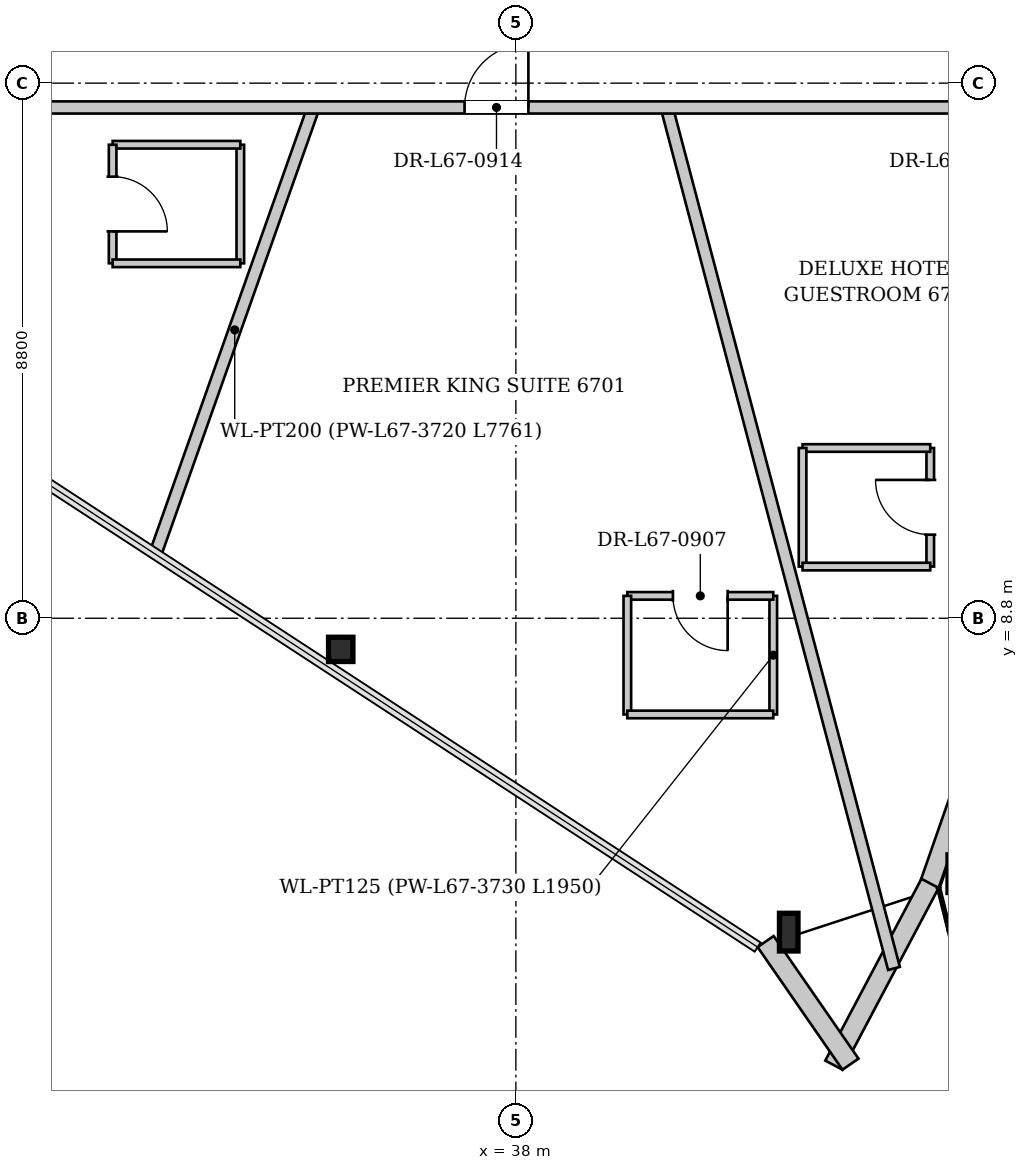
"""IFC4 building model, lengths in metres.
Left out: names, types, materials, properties, quantities, classifications, styles, units other than length and angle.
Written with IfcOpenShell. Run it as: python <this file> out.ifc"""

import sys

from ifc_helpers import new_model, si_unit, direction, frame, frame_2d, origin, origin_2d, place, context, subcontext, project, spatial, rectangle, i_section, extrude, source, transform, mapped, element, fill, save


model = new_model("IFC4")
c1 = context("Model", 3, precision=1e-05, world=origin(), true_north=direction((0.0, 1.0)))
c2 = subcontext(c1, "Body", "Model", "MODEL_VIEW")
j1 = project(units=[si_unit("LENGTHUNIT", "METRE"), si_unit("PLANEANGLEUNIT", "RADIAN")], contexts=[c1])
p1 = place(None, origin())
s1 = spatial("IfcSite", under=j1, at=p1, CompositionType="ELEMENT")
p2 = place(p1, origin())
s2 = spatial("IfcBuilding", under=s1, at=p2, CompositionType="ELEMENT")
p3 = place(p2, frame((0.0, 0.0, 252.5)))
s3 = spatial("IfcBuildingStorey", under=s2, at=p3, CompositionType="ELEMENT", Elevation=252.5)
m1 = source(origin(), c2, "Body", "SweptSolid", [
    extrude(i_section(OverallWidth=0.401, OverallDepth=0.399, WebThickness=0.022, FlangeThickness=0.034, at=origin_2d()), origin(), (0.0, 0.0, 1.0), 3.565),
])
p4 = place(p3, frame((34.659, 8.166, 0.0), z_axis=(0.25846285316, 0.068553607847, 0.963585676724), x_axis=(-0.256371217802, 0.966578397587, 0.0)))
e1 = element("IfcColumn", 1, at=p4, inside=s3, PredefinedType="COLUMN", context=c2, shape_type="MappedRepresentation", body=[
    mapped(m1, transform((0.0, 0.0, 0.0), x_axis=(1.0, 0.0, 0.0), y_axis=(0.0, 1.0, 0.0), z_axis=(0.0, 0.0, 1.0), scale=1.0)),
])
m2 = source(origin(), c2, "Body", "SweptSolid", [
    extrude(i_section(OverallWidth=0.305, OverallDepth=0.62, WebThickness=0.021, FlangeThickness=0.04, at=origin_2d()), origin(), (0.0, 0.0, 1.0), 3.618),
])
p5 = place(p3, frame((41.976, 3.392, 0.0), z_axis=(0.282567518432, 0.136121013776, 0.949540239872), x_axis=(-0.433996754877, 0.900914433649, 0.0)))
e2 = element("IfcColumn", 2, at=p5, inside=s3, PredefinedType="COLUMN", context=c2, shape_type="MappedRepresentation", body=[
    mapped(m2, transform((0.0, 0.0, 0.0), x_axis=(1.0, 0.0, 0.0), y_axis=(0.0, 1.0, 0.0), z_axis=(0.0, 0.0, 1.0), scale=1.0)),
])
m3 = source(origin(), c2, "Body", "SweptSolid", [
    extrude(i_section(OverallWidth=0.305, OverallDepth=0.62, WebThickness=0.021, FlangeThickness=0.04, at=origin_2d()), origin(), (0.0, 0.0, 1.0), 3.521),
])
p6 = place(p3, frame((44.953, 4.365, 0.0), z_axis=(0.174187178706, 0.133344723189, 0.975642358435), x_axis=(-0.607860680587, 0.794043697158, 0.0)))
e3 = element("IfcColumn", 3, at=p6, inside=s3, PredefinedType="COLUMN", context=c2, shape_type="MappedRepresentation", body=[
    mapped(m3, transform((0.0, 0.0, 0.0), x_axis=(1.0, 0.0, 0.0), y_axis=(0.0, 1.0, 0.0), z_axis=(0.0, 0.0, 1.0), scale=1.0)),
])
p7 = place(p3, frame((52.264, 25.817, 0.0), z_axis=(0.0, 0.0, 1.0), x_axis=(-0.329283040193, -0.944231263749, 0.0)))
e4 = element("IfcWall", 4, at=p7, inside=s3, PredefinedType="SOLIDWALL", context=c2, shape_type="SweptSolid", body=[
    extrude(rectangle(XDim=22.663, YDim=0.32, at=frame_2d((11.332, 0.0))), origin(), (0.0, 0.0, 1.0), 2.872),
])
p8 = place(p7, frame((6.502, 0.0, 0.0)))
e5 = element("IfcOpeningElement", 5, at=p8, cuts=e4, PredefinedType="OPENING", context=c2, shape_type="SweptSolid", body=[
    extrude(rectangle(XDim=1.5, YDim=2.3, at=frame_2d((0.75, 1.15))), frame((0.0, 0.17, 0.0), z_axis=(0.0, -1.0, 0.0), x_axis=(1.0, 0.0, 0.0)), (0.0, 0.0, 1.0), 0.34),
])
p9 = place(p7, frame((15.471, 0.0, 0.402)))
e6 = element("IfcOpeningElement", 6, at=p9, cuts=e4, PredefinedType="OPENING", context=c2, shape_type="SweptSolid", body=[
    extrude(rectangle(XDim=2.6, YDim=2.35, at=frame_2d((1.3, 1.175))), frame((0.0, 0.17, 0.0), z_axis=(0.0, -1.0, 0.0), x_axis=(1.0, 0.0, 0.0)), (0.0, 0.0, 1.0), 0.34),
])
p10 = place(p3, frame((44.812, 4.44, 0.0), z_axis=(0.0, 0.0, 1.0), x_axis=(-0.467628956956, -0.883924860277, 0.0)))
e7 = element("IfcWall", 7, at=p10, inside=s3, PredefinedType="SOLIDWALL", context=c2, shape_type="SweptSolid", body=[
    extrude(rectangle(XDim=3.382, YDim=0.32, at=frame_2d((1.691, 0.0))), origin(), (0.0, 0.0, 1.0), 2.872),
])
p11 = place(p3, frame((43.503, 1.467, 0.0), z_axis=(0.0, 0.0, 1.0), x_axis=(-0.569023575379, 0.822321208934, 0.0)))
e8 = element("IfcWall", 8, at=p11, inside=s3, PredefinedType="SOLIDWALL", context=c2, shape_type="SweptSolid", body=[
    extrude(rectangle(XDim=2.452, YDim=0.32, at=frame_2d((1.226, 0.0))), origin(), (0.0, 0.0, 1.0), 2.872),
])
p12 = place(p3, frame((34.671, 17.2, 0.0), z_axis=(0.0, 0.0, 1.0), x_axis=(-0.333820355847, -0.942636711582, 0.0)))
e9 = element("IfcWall", 9, at=p12, inside=s3, PredefinedType="PARTITIONING", context=c2, shape_type="SweptSolid", body=[
    extrude(rectangle(XDim=7.761, YDim=0.2, at=frame_2d((3.881, 0.0))), origin(), (0.0, 0.0, 1.0), 3.38),
])
p13 = place(p3, frame((40.481, 17.2, 0.0), z_axis=(0.0, 0.0, 1.0), x_axis=(0.255204698794, -0.96688704703, 0.0)))
e10 = element("IfcWall", 10, at=p13, inside=s3, PredefinedType="PARTITIONING", context=c2, shape_type="SweptSolid", body=[
    extrude(rectangle(XDim=14.644, YDim=0.2, at=frame_2d((7.322, 0.0))), origin(), (0.0, 0.0, 1.0), 3.38),
])
p14 = place(p3, frame((42.233, 7.218, 0.0), z_axis=(0.0, 0.0, 1.0), x_axis=(0.0, 1.0, 0.0)))
e11 = element("IfcWall", 11, at=p14, inside=s3, PredefinedType="PARTITIONING", context=c2, shape_type="SweptSolid", body=[
    extrude(rectangle(XDim=1.95, YDim=0.125, at=frame_2d((0.975, 0.0))), origin(), (0.0, 0.0, 1.0), 3.055),
])
p15 = place(p3, frame((42.233, 9.168, 0.0), z_axis=(0.0, 0.0, 1.0), x_axis=(-1.0, 0.0, 0.0)))
e12 = element("IfcWall", 12, at=p15, inside=s3, PredefinedType="PARTITIONING", context=c2, shape_type="SweptSolid", body=[
    extrude(rectangle(XDim=2.4, YDim=0.125, at=frame_2d((1.2, 0.0))), origin(), (0.0, 0.0, 1.0), 3.38),
])
p16 = place(p15, frame((0.75, 0.0, 0.0)))
e13 = element("IfcOpeningElement", 13, at=p16, cuts=e12, PredefinedType="OPENING", context=c2, shape_type="SweptSolid", body=[
    extrude(rectangle(XDim=0.9, YDim=2.1, at=frame_2d((0.45, 1.05))), frame((0.0, 0.073, 0.0), z_axis=(0.0, -1.0, 0.0), x_axis=(1.0, 0.0, 0.0)), (0.0, 0.0, 1.0), 0.145),
])
p17 = place(p3, frame((39.833, 9.168, 0.0), z_axis=(0.0, 0.0, 1.0), x_axis=(0.0, -1.0, 0.0)))
e14 = element("IfcWall", 14, at=p17, inside=s3, PredefinedType="PARTITIONING", context=c2, shape_type="SweptSolid", body=[
    extrude(rectangle(XDim=1.95, YDim=0.125, at=frame_2d((0.975, 0.0))), origin(), (0.0, 0.0, 1.0), 3.38),
])
p18 = place(p3, frame((39.833, 7.218, 0.0), z_axis=(0.0, 0.0, 1.0), x_axis=(1.0, 0.0, 0.0)))
e15 = element("IfcWall", 15, at=p18, inside=s3, PredefinedType="PARTITIONING", context=c2, shape_type="SweptSolid", body=[
    extrude(rectangle(XDim=2.4, YDim=0.125, at=frame_2d((1.2, 0.0))), origin(), (0.0, 0.0, 1.0), 3.38),
])
p19 = place(p3, frame((44.815, 9.65, 0.0), z_axis=(0.0, 0.0, 1.0), x_axis=(0.0, 1.0, 0.0)))
e16 = element("IfcWall", 16, at=p19, inside=s3, PredefinedType="PARTITIONING", context=c2, shape_type="SweptSolid", body=[
    extrude(rectangle(XDim=1.95, YDim=0.125, at=frame_2d((0.975, 0.0))), origin(), (0.0, 0.0, 1.0), 3.38),
])
p20 = place(p19, frame((0.525, 0.0, 0.0)))
e17 = element("IfcOpeningElement", 17, at=p20, cuts=e16, PredefinedType="OPENING", context=c2, shape_type="SweptSolid", body=[
    extrude(rectangle(XDim=0.9, YDim=2.1, at=frame_2d((0.45, 1.05))), frame((0.0, 0.073, 0.0), z_axis=(0.0, -1.0, 0.0), x_axis=(1.0, 0.0, 0.0)), (0.0, 0.0, 1.0), 0.145),
])
p21 = place(p3, frame((44.815, 11.6, 0.0), z_axis=(0.0, 0.0, 1.0), x_axis=(-1.0, 0.0, 0.0)))
e18 = element("IfcWall", 18, at=p21, inside=s3, PredefinedType="PARTITIONING", context=c2, shape_type="SweptSolid", body=[
    extrude(rectangle(XDim=2.1, YDim=0.125, at=frame_2d((1.05, 0.0))), origin(), (0.0, 0.0, 1.0), 3.38),
])
p22 = place(p3, frame((42.715, 11.6, 0.0), z_axis=(0.0, 0.0, 1.0), x_axis=(0.0, -1.0, 0.0)))
e19 = element("IfcWall", 19, at=p22, inside=s3, PredefinedType="PARTITIONING", context=c2, shape_type="SweptSolid", body=[
    extrude(rectangle(XDim=1.95, YDim=0.125, at=frame_2d((0.975, 0.0))), origin(), (0.0, 0.0, 1.0), 3.055),
])
p23 = place(p3, frame((42.715, 9.65, 0.0), z_axis=(0.0, 0.0, 1.0), x_axis=(1.0, 0.0, 0.0)))
e20 = element("IfcWall", 20, at=p23, inside=s3, PredefinedType="PARTITIONING", context=c2, shape_type="SweptSolid", body=[
    extrude(rectangle(XDim=2.1, YDim=0.125, at=frame_2d((1.05, 0.0))), origin(), (0.0, 0.0, 1.0), 3.38),
])
p24 = place(p3, frame((33.468, 14.637, 0.0), z_axis=(0.0, 0.0, 1.0), x_axis=(0.0, 1.0, 0.0)))
e21 = element("IfcWall", 21, at=p24, inside=s3, PredefinedType="PARTITIONING", context=c2, shape_type="SweptSolid", body=[
    extrude(rectangle(XDim=1.95, YDim=0.125, at=frame_2d((0.975, 0.0))), origin(), (0.0, 0.0, 1.0), 3.38),
])
p25 = place(p3, frame((33.468, 16.587, 0.0), z_axis=(0.0, 0.0, 1.0), x_axis=(-1.0, 0.0, 0.0)))
e22 = element("IfcWall", 22, at=p25, inside=s3, PredefinedType="PARTITIONING", context=c2, shape_type="SweptSolid", body=[
    extrude(rectangle(XDim=2.1, YDim=0.125, at=frame_2d((1.05, 0.0))), origin(), (0.0, 0.0, 1.0), 3.38),
])
p26 = place(p3, frame((31.368, 16.587, 0.0), z_axis=(0.0, 0.0, 1.0), x_axis=(0.0, -1.0, 0.0)))
e23 = element("IfcWall", 23, at=p26, inside=s3, PredefinedType="PARTITIONING", context=c2, shape_type="SweptSolid", body=[
    extrude(rectangle(XDim=1.95, YDim=0.125, at=frame_2d((0.975, 0.0))), origin(), (0.0, 0.0, 1.0), 3.38),
])
p27 = place(p26, frame((0.525, 0.0, 0.0)))
e24 = element("IfcOpeningElement", 24, at=p27, cuts=e23, PredefinedType="OPENING", context=c2, shape_type="SweptSolid", body=[
    extrude(rectangle(XDim=0.9, YDim=2.1, at=frame_2d((0.45, 1.05))), frame((0.0, 0.073, 0.0), z_axis=(0.0, -1.0, 0.0), x_axis=(1.0, 0.0, 0.0)), (0.0, 0.0, 1.0), 0.145),
])
p28 = place(p3, frame((31.368, 14.637, 0.0), z_axis=(0.0, 0.0, 1.0), x_axis=(1.0, 0.0, 0.0)))
e25 = element("IfcWall", 25, at=p28, inside=s3, PredefinedType="PARTITIONING", context=c2, shape_type="SweptSolid", body=[
    extrude(rectangle(XDim=2.1, YDim=0.125, at=frame_2d((1.05, 0.0))), origin(), (0.0, 0.0, 1.0), 3.38),
])
p29 = place(p3, frame((27.8, 17.2, 0.0), z_axis=(0.0, 0.0, 1.0), x_axis=(1.0, 0.0, 0.0)))
e26 = element("IfcWall", 26, at=p29, inside=s3, PredefinedType="PARTITIONING", context=c2, shape_type="SweptSolid", body=[
    extrude(rectangle(XDim=20.4, YDim=0.2, at=frame_2d((10.2, 0.0))), origin(), (0.0, 0.0, 1.0), 3.38),
])
p30 = place(p29, frame((9.356, 0.0, 0.0)))
e27 = element("IfcOpeningElement", 27, at=p30, cuts=e26, PredefinedType="OPENING", context=c2, shape_type="SweptSolid", body=[
    extrude(rectangle(XDim=1.05, YDim=2.2, at=frame_2d((0.525, 1.1))), frame((0.0, 0.11, 0.0), z_axis=(0.0, -1.0, 0.0), x_axis=(1.0, 0.0, 0.0)), (0.0, 0.0, 1.0), 0.22),
])
p31 = place(p29, frame((17.51, 0.0, 0.0)))
e28 = element("IfcOpeningElement", 28, at=p31, cuts=e26, PredefinedType="OPENING", context=c2, shape_type="SweptSolid", body=[
    extrude(rectangle(XDim=1.05, YDim=2.2, at=frame_2d((0.525, 1.1))), frame((0.0, 0.11, 0.0), z_axis=(0.0, -1.0, 0.0), x_axis=(1.0, 0.0, 0.0)), (0.0, 0.0, 1.0), 0.22),
])
p32 = place(p29, frame((0.412, 0.0, 0.0)))
e29 = element("IfcOpeningElement", 29, at=p32, cuts=e26, PredefinedType="OPENING", context=c2, shape_type="SweptSolid", body=[
    extrude(rectangle(XDim=1.05, YDim=2.2, at=frame_2d((0.525, 1.1))), frame((0.0, 0.11, 0.0), z_axis=(0.0, -1.0, 0.0), x_axis=(1.0, 0.0, 0.0)), (0.0, 0.0, 1.0), 0.22),
])
m4 = source(origin(), c2, "Body", "SweptSolid", [
    extrude(rectangle(XDim=0.9, YDim=2.1, at=frame_2d((0.45, 1.05))), frame((0.0, 0.025, 0.0), z_axis=(0.0, -1.0, 0.0), x_axis=(1.0, 0.0, 0.0)), (0.0, 0.0, 1.0), 0.05),
])
p33 = place(p16, origin())
e30 = element("IfcDoor", 30, at=p33, inside=s3, OperationType="SINGLE_SWING_LEFT", PredefinedType="DOOR", context=c2, shape_type="MappedRepresentation", body=[
    mapped(m4, transform((0.0, 0.0, 0.0), x_axis=(1.0, 0.0, 0.0), y_axis=(0.0, 1.0, 0.0), z_axis=(0.0, 0.0, 1.0), scale=1.0)),
])
fill(e13, e30)
p34 = place(p20, origin())
e31 = element("IfcDoor", 31, at=p34, inside=s3, OperationType="SINGLE_SWING_RIGHT", PredefinedType="DOOR", context=c2, shape_type="MappedRepresentation", body=[
    mapped(m4, transform((0.0, 0.0, 0.0), x_axis=(1.0, 0.0, 0.0), y_axis=(0.0, 1.0, 0.0), z_axis=(0.0, 0.0, 1.0), scale=1.0)),
])
fill(e17, e31)
p35 = place(p27, origin())
e32 = element("IfcDoor", 32, at=p35, inside=s3, OperationType="SINGLE_SWING_RIGHT", PredefinedType="DOOR", context=c2, shape_type="MappedRepresentation", body=[
    mapped(m4, transform((0.0, 0.0, 0.0), x_axis=(1.0, 0.0, 0.0), y_axis=(0.0, 1.0, 0.0), z_axis=(0.0, 0.0, 1.0), scale=1.0)),
])
fill(e24, e32)
m5 = source(origin(), c2, "Body", "SweptSolid", [
    extrude(rectangle(XDim=1.05, YDim=2.2, at=frame_2d((0.525, 1.1))), frame((0.0, 0.025, 0.0), z_axis=(0.0, -1.0, 0.0), x_axis=(1.0, 0.0, 0.0)), (0.0, 0.0, 1.0), 0.05),
])
p36 = place(p30, origin())
e33 = element("IfcDoor", 33, at=p36, inside=s3, OperationType="SINGLE_SWING_RIGHT", PredefinedType="DOOR", context=c2, shape_type="MappedRepresentation", body=[
    mapped(m5, transform((0.0, 0.0, 0.0), x_axis=(1.0, 0.0, 0.0), y_axis=(0.0, 1.0, 0.0), z_axis=(0.0, 0.0, 1.0), scale=1.0)),
])
fill(e27, e33)
save(model, sys.argv[1])
